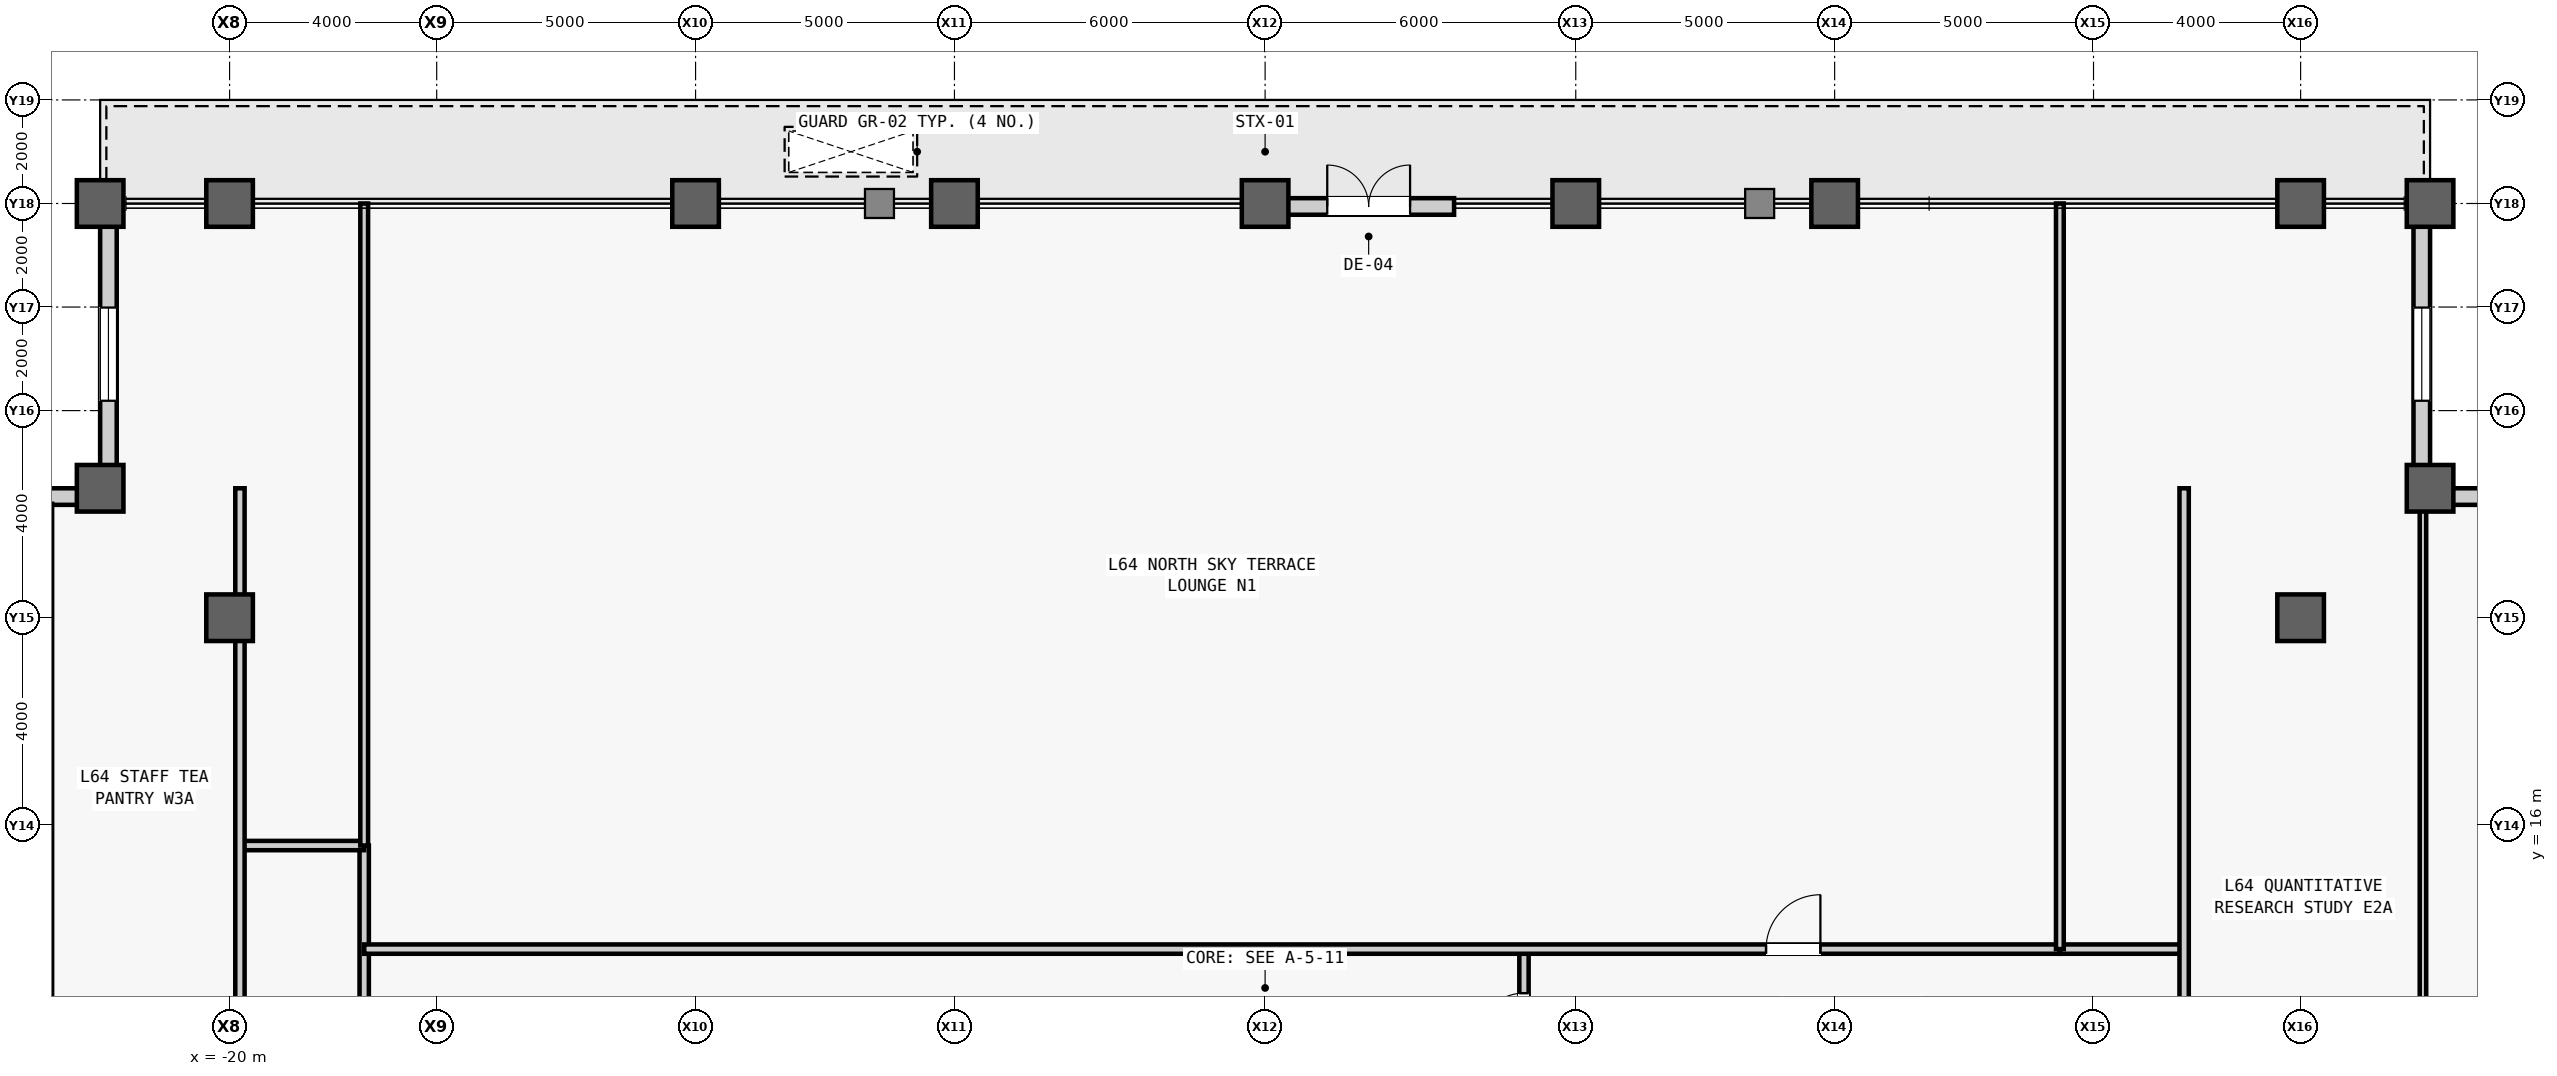
"""IFC4 building model, lengths in metres.
Left out: names, types, materials, properties, quantities, classifications, styles, units other than length and angle.
Written with IfcOpenShell. Run it as: python <this file> out.ifc"""

import sys

from ifc_helpers import new_model, si_unit, direction, frame, frame_2d, origin, origin_2d, place, context, subcontext, project, spatial, rectangle, hollow_rectangle, extrude, source, transform, mapped, element, fill, save


model = new_model("IFC4")
c1 = context("Model", 3, precision=1e-05, world=origin(), true_north=direction((0.0, 1.0)))
c2 = subcontext(c1, "Body", "Model", "MODEL_VIEW")
j1 = project(units=[si_unit("LENGTHUNIT", "METRE"), si_unit("PLANEANGLEUNIT", "RADIAN")], contexts=[c1])
p1 = place(None, origin())
s1 = spatial("IfcSite", under=j1, at=p1, CompositionType="ELEMENT")
p2 = place(p1, origin())
s2 = spatial("IfcBuilding", under=s1, at=p2, CompositionType="ELEMENT")
p3 = place(p2, frame((0.0, 0.0, 273.5)))
s3 = spatial("IfcBuildingStorey", under=s2, at=p3, CompositionType="ELEMENT", Elevation=273.5)
m1 = source(origin(), c2, "Body", "SweptSolid", [
    extrude(hollow_rectangle(XDim=0.9, YDim=0.9, WallThickness=0.05, at=origin_2d()), origin(), (0.0, 0.0, 1.0), 4.0),
])
for number, where, z_axis, x_axis in (
    (1, (-22.5, 22.5, 0.0), (0.0, 0.0, 1.0), (1.0, 0.0, 0.0)),
    (2, (-22.5, 28.0, 0.0), (0.0, 0.0, 1.0), (1.0, 0.0, 0.0)),
    (3, (-20.0, 20.0, 0.0), (0.0, 0.0, 1.0), (1.0, 0.0, 0.0)),
    (4, (-20.0, 28.0, 0.0), (0.0, 0.0, 1.0), (1.0, 0.0, 0.0)),
    (5, (-11.0, 28.0, 0.0), (0.0, 0.0, 1.0), (1.0, 0.0, 0.0)),
    (6, (-6.0, 28.0, 0.0), (0.0, 0.0, 1.0), (1.0, 0.0, 0.0)),
    (7, (0.0, 28.0, 0.0), (0.0, 0.0, 1.0), (1.0, 0.0, 0.0)),
    (8, (6.0, 28.0, 0.0), (0.0, 0.0, 1.0), (1.0, 0.0, 0.0)),
    (9, (11.0, 28.0, 0.0), (0.0, 0.0, 1.0), (1.0, 0.0, 0.0)),
    (10, (20.0, 20.0, 0.0), (0.0, 0.0, 1.0), (1.0, 0.0, 0.0)),
    (11, (20.0, 28.0, 0.0), (0.0, 0.0, 1.0), (1.0, 0.0, 0.0)),
    (12, (22.5, 22.5, 0.0), (0.0, 0.0, 1.0), (1.0, 0.0, 0.0)),
    (13, (22.5, 28.0, 0.0), (0.0, 0.0, 1.0), (1.0, 0.0, 0.0)),
):
    element("IfcColumn", number, at=place(p3, frame(where, z_axis=z_axis, x_axis=x_axis)), inside=s3, PredefinedType="COLUMN", context=c2, shape_type="MappedRepresentation", body=[
        mapped(m1, transform((0.0, 0.0, 0.0), scale=1.0)),
    ])
m2 = source(origin(), c2, "Body", "SweptSolid", [
    extrude(rectangle(XDim=5.18, YDim=0.32, at=frame_2d((2.59, 0.0))), origin(), (0.0, 0.0, 1.0), 3.231),
])
p4 = place(p3, frame((22.5, 22.34, 0.0), z_axis=(0.0, 0.0, 1.0), x_axis=(1.0, 0.0, 0.0)))
e14 = element("IfcWall", 14, at=p4, inside=s3, PredefinedType="STANDARD", context=c2, shape_type="MappedRepresentation", body=[
    mapped(m2, transform((0.0, 0.0, 0.0), scale=1.0)),
])
m3 = source(origin(), c2, "Body", "SweptSolid", [
    extrude(rectangle(XDim=1.8, YDim=2.4, at=frame_2d((0.9, 1.2))), frame((0.0, 0.17, 0.0), z_axis=(0.0, -1.0, 0.0), x_axis=(1.0, 0.0, 0.0)), (0.0, 0.0, 1.0), 0.34),
])
p5 = place(p4, frame((1.69, 0.0, 0.5)))
e15 = element("IfcOpeningElement", 15, at=p5, cuts=e14, PredefinedType="OPENING", context=c2, shape_type="MappedRepresentation", body=[
    mapped(m3, transform((0.0, 0.0, 0.0), scale=1.0)),
])
p6 = place(p3, frame((22.34, 22.5, 0.0), z_axis=(0.0, 0.0, 1.0), x_axis=(0.0, 1.0, 0.0)))
e16 = element("IfcWall", 16, at=p6, inside=s3, PredefinedType="STANDARD", context=c2, shape_type="MappedRepresentation", body=[
    mapped(m2, transform((0.0, 0.0, 0.0), scale=1.0)),
])
p7 = place(p6, frame((1.69, 0.0, 0.5)))
e17 = element("IfcOpeningElement", 17, at=p7, cuts=e16, PredefinedType="OPENING", context=c2, shape_type="MappedRepresentation", body=[
    mapped(m3, transform((0.0, 0.0, 0.0), scale=1.0)),
])
p8 = place(p3, frame((-22.34, 22.5, 0.0), z_axis=(0.0, 0.0, 1.0), x_axis=(0.0, 1.0, 0.0)))
e18 = element("IfcWall", 18, at=p8, inside=s3, PredefinedType="STANDARD", context=c2, shape_type="MappedRepresentation", body=[
    mapped(m2, transform((0.0, 0.0, 0.0), scale=1.0)),
])
p9 = place(p8, frame((1.69, 0.0, 0.5)))
e19 = element("IfcOpeningElement", 19, at=p9, cuts=e18, PredefinedType="OPENING", context=c2, shape_type="MappedRepresentation", body=[
    mapped(m3, transform((0.0, 0.0, 0.0), scale=1.0)),
])
p10 = place(p3, frame((-22.5, 22.34, 0.0), z_axis=(0.0, 0.0, 1.0), x_axis=(-1.0, 0.0, 0.0)))
e20 = element("IfcWall", 20, at=p10, inside=s3, PredefinedType="STANDARD", context=c2, shape_type="MappedRepresentation", body=[
    mapped(m2, transform((0.0, 0.0, 0.0), scale=1.0)),
])
p11 = place(p10, frame((1.69, 0.0, 0.5)))
e21 = element("IfcOpeningElement", 21, at=p11, cuts=e20, PredefinedType="OPENING", context=c2, shape_type="MappedRepresentation", body=[
    mapped(m3, transform((0.0, 0.0, 0.0), scale=1.0)),
])
m4 = source(origin(), c2, "Body", "SweptSolid", [
    extrude(rectangle(XDim=3.3, YDim=0.32, at=frame_2d((1.65, 0.0))), origin(), (0.0, 0.0, 1.0), 3.231),
])
p12 = place(p3, frame((0.35, 27.942, 0.0), z_axis=(0.0, 0.0, 1.0), x_axis=(1.0, 0.0, 0.0)))
e22 = element("IfcWall", 22, at=p12, inside=s3, PredefinedType="STANDARD", context=c2, shape_type="MappedRepresentation", body=[
    mapped(m4, transform((0.0, 0.0, 0.0), scale=1.0)),
])
m5 = source(origin(), c2, "Body", "SweptSolid", [
    extrude(rectangle(XDim=1.6, YDim=2.25, at=frame_2d((0.8, 1.125))), frame((0.0, 0.17, 0.0), z_axis=(0.0, -1.0, 0.0), x_axis=(1.0, 0.0, 0.0)), (0.0, 0.0, 1.0), 0.34),
])
p13 = place(p12, frame((0.85, 0.0, 0.0)))
e23 = element("IfcOpeningElement", 23, at=p13, cuts=e22, PredefinedType="OPENING", context=c2, shape_type="MappedRepresentation", body=[
    mapped(m5, transform((0.0, 0.0, 0.0), scale=1.0)),
])
m6 = source(origin(), c2, "Body", "SweptSolid", [
    extrude(rectangle(XDim=8.4, YDim=0.18, at=frame_2d((4.2, 0.0))), origin(), (0.0, 0.0, 1.0), 3.78),
])
p14 = place(p3, frame((-17.4, 7.2, 0.0), z_axis=(0.0, 0.0, 1.0), x_axis=(0.0, 1.0, 0.0)))
e24 = element("IfcWall", 24, at=p14, inside=s3, PredefinedType="PARTITIONING", context=c2, shape_type="MappedRepresentation", body=[
    mapped(m6, transform((0.0, 0.0, 0.0), scale=1.0)),
])
m7 = source(origin(), c2, "Body", "SweptSolid", [
    extrude(rectangle(XDim=2.6, YDim=0.18, at=frame_2d((1.3, 0.0))), origin(), (0.0, 0.0, 1.0), 3.78),
])
p15 = place(p3, frame((5.0, 11.0, 0.0), z_axis=(0.0, 0.0, 1.0), x_axis=(0.0, 1.0, 0.0)))
e25 = element("IfcWall", 25, at=p15, inside=s3, PredefinedType="PARTITIONING", context=c2, shape_type="MappedRepresentation", body=[
    mapped(m7, transform((0.0, 0.0, 0.0), scale=1.0)),
])
m8 = source(origin(), c2, "Body", "SweptSolid", [
    extrude(rectangle(XDim=0.9, YDim=2.15, at=frame_2d((0.45, 1.075))), frame((0.0, 0.1, 0.0), z_axis=(0.0, -1.0, 0.0), x_axis=(1.0, 0.0, 0.0)), (0.0, 0.0, 1.0), 0.2),
])
p16 = place(p15, frame((0.85, 0.0, 0.0)))
e26 = element("IfcOpeningElement", 26, at=p16, cuts=e25, PredefinedType="OPENING", context=c2, shape_type="MappedRepresentation", body=[
    mapped(m8, transform((0.0, 0.0, 0.0), scale=1.0)),
])
m9 = source(origin(), c2, "Body", "SweptSolid", [
    extrude(rectangle(XDim=2.4, YDim=0.18, at=frame_2d((1.2, 0.0))), origin(), (0.0, 0.0, 1.0), 3.78),
])
p17 = place(p3, frame((-19.8, 15.6, 0.0), z_axis=(0.0, 0.0, 1.0), x_axis=(1.0, 0.0, 0.0)))
e27 = element("IfcWall", 27, at=p17, inside=s3, PredefinedType="PARTITIONING", context=c2, shape_type="MappedRepresentation", body=[
    mapped(m9, transform((0.0, 0.0, 0.0), scale=1.0)),
])
m10 = source(origin(), c2, "Body", "SweptSolid", [
    extrude(rectangle(XDim=2.4, YDim=0.18, at=frame_2d((1.2, 0.0))), origin(), (0.0, 0.0, 1.0), 3.78),
])
p18 = place(p3, frame((15.35, 13.6, 0.0), z_axis=(0.0, 0.0, 1.0), x_axis=(1.0, 0.0, 0.0)))
e28 = element("IfcWall", 28, at=p18, inside=s3, PredefinedType="PARTITIONING", context=c2, shape_type="MappedRepresentation", body=[
    mapped(m10, transform((0.0, 0.0, 0.0), scale=1.0)),
])
m11 = source(origin(), c2, "Body", "SweptSolid", [
    extrude(rectangle(XDim=32.75, YDim=0.18, at=frame_2d((16.375, 0.0))), origin(), (0.0, 0.0, 1.0), 3.78),
])
p19 = place(p3, frame((-17.4, 13.6, 0.0), z_axis=(0.0, 0.0, 1.0), x_axis=(1.0, 0.0, 0.0)))
e29 = element("IfcWall", 29, at=p19, inside=s3, PredefinedType="PARTITIONING", context=c2, shape_type="MappedRepresentation", body=[
    mapped(m11, transform((0.0, 0.0, 0.0), scale=1.0)),
])
m12 = source(origin(), c2, "Body", "SweptSolid", [
    extrude(rectangle(XDim=1.05, YDim=2.2, at=frame_2d((0.525, 1.1))), frame((0.0, 0.1, 0.0), z_axis=(0.0, -1.0, 0.0), x_axis=(1.0, 0.0, 0.0)), (0.0, 0.0, 1.0), 0.2),
])
p20 = place(p19, frame((27.075, 0.0, 0.0)))
e30 = element("IfcOpeningElement", 30, at=p20, cuts=e29, PredefinedType="OPENING", context=c2, shape_type="MappedRepresentation", body=[
    mapped(m12, transform((0.0, 0.0, 0.0), scale=1.0)),
])
m13 = source(origin(), c2, "Body", "SweptSolid", [
    extrude(rectangle(XDim=12.4, YDim=0.15, at=frame_2d((6.2, 0.0))), origin(), (0.0, 0.0, 1.0), 3.78),
])
p21 = place(p3, frame((-17.4, 15.6, 0.0), z_axis=(0.0, 0.0, 1.0), x_axis=(0.0, 1.0, 0.0)))
e31 = element("IfcWall", 31, at=p21, inside=s3, PredefinedType="PARTITIONING", context=c2, shape_type="MappedRepresentation", body=[
    mapped(m13, transform((0.0, 0.0, 0.0), scale=1.0)),
])
m14 = source(origin(), c2, "Body", "SweptSolid", [
    extrude(rectangle(XDim=14.4, YDim=0.15, at=frame_2d((7.2, 0.0))), origin(), (0.0, 0.0, 1.0), 3.78),
])
p22 = place(p3, frame((15.35, 13.6, 0.0), z_axis=(0.0, 0.0, 1.0), x_axis=(0.0, 1.0, 0.0)))
e32 = element("IfcWall", 32, at=p22, inside=s3, PredefinedType="PARTITIONING", context=c2, shape_type="MappedRepresentation", body=[
    mapped(m14, transform((0.0, 0.0, 0.0), scale=1.0)),
])
m15 = source(origin(), c2, "Body", "SweptSolid", [
    extrude(rectangle(XDim=41.2, YDim=0.18, at=frame_2d((20.6, 0.0))), origin(), (0.0, 0.0, 1.0), 3.164),
])
p23 = place(p3, frame((-19.8, -18.7, 0.0), z_axis=(0.0, 0.0, 1.0), x_axis=(0.0, 1.0, 0.0)))
e33 = element("IfcWall", 33, at=p23, inside=s3, PredefinedType="PARTITIONING", context=c2, shape_type="MappedRepresentation", body=[
    mapped(m15, transform((0.0, 0.0, 0.0), scale=1.0)),
])
m16 = source(origin(), c2, "Body", "SweptSolid", [
    extrude(rectangle(XDim=0.95, YDim=2.15, at=frame_2d((0.475, 1.075))), frame((0.0, 0.1, 0.0), z_axis=(0.0, -1.0, 0.0), x_axis=(1.0, 0.0, 0.0)), (0.0, 0.0, 1.0), 0.2),
])
p24 = place(p23, frame((7.329, 0.0, 0.0)))
e34 = element("IfcOpeningElement", 34, at=p24, cuts=e33, PredefinedType="OPENING", context=c2, shape_type="MappedRepresentation", body=[
    mapped(m16, transform((0.0, 0.0, 0.0), scale=1.0)),
])
p25 = place(p23, frame((17.875, 0.0, 0.0)))
e35 = element("IfcOpeningElement", 35, at=p25, cuts=e33, PredefinedType="OPENING", context=c2, shape_type="MappedRepresentation", body=[
    mapped(m16, transform((0.0, 0.0, 0.0), scale=1.0)),
])
p26 = place(p23, frame((28.421, 0.0, 0.0)))
e36 = element("IfcOpeningElement", 36, at=p26, cuts=e33, PredefinedType="OPENING", context=c2, shape_type="MappedRepresentation", body=[
    mapped(m16, transform((0.0, 0.0, 0.0), scale=1.0)),
])
m17 = source(origin(), c2, "Body", "SweptSolid", [
    extrude(rectangle(XDim=23.85, YDim=0.125, at=frame_2d((11.925, 0.0))), origin(), (0.0, 0.0, 1.0), 3.164),
])
p27 = place(p3, frame((22.363, -1.35, 0.0), z_axis=(0.0, 0.0, 1.0), x_axis=(0.0, 1.0, 0.0)))
e37 = element("IfcWall", 37, at=p27, inside=s3, PredefinedType="PARTITIONING", context=c2, shape_type="MappedRepresentation", body=[
    mapped(m17, transform((0.0, 0.0, 0.0), scale=1.0)),
])
m18 = source(origin(), c2, "Body", "SweptSolid", [
    extrude(rectangle(XDim=0.95, YDim=2.15, at=frame_2d((0.475, 1.075))), frame((0.0, 0.073, 0.0), z_axis=(0.0, -1.0, 0.0), x_axis=(1.0, 0.0, 0.0)), (0.0, 0.0, 1.0), 0.145),
])
p28 = place(p27, frame((7.0, 0.0, 0.0)))
e38 = element("IfcOpeningElement", 38, at=p28, cuts=e37, PredefinedType="OPENING", context=c2, shape_type="MappedRepresentation", body=[
    mapped(m18, transform((0.0, 0.0, 0.0), scale=1.0)),
])
m19 = source(origin(), c2, "Body", "SweptSolid", [
    extrude(rectangle(XDim=41.2, YDim=0.18, at=frame_2d((20.6, 0.0))), origin(), (0.0, 0.0, 1.0), 3.78),
])
p29 = place(p3, frame((17.75, -18.7, 0.0), z_axis=(0.0, 0.0, 1.0), x_axis=(0.0, 1.0, 0.0)))
e39 = element("IfcWall", 39, at=p29, inside=s3, PredefinedType="PARTITIONING", context=c2, shape_type="MappedRepresentation", body=[
    mapped(m19, transform((0.0, 0.0, 0.0), scale=1.0)),
])
p30 = place(p29, frame((9.7, 0.0, 0.0)))
e40 = element("IfcOpeningElement", 40, at=p30, cuts=e39, PredefinedType="OPENING", context=c2, shape_type="MappedRepresentation", body=[
    mapped(m16, transform((0.0, 0.0, 0.0), scale=1.0)),
])
p31 = place(p29, frame((24.05, 0.0, 0.0)))
e41 = element("IfcOpeningElement", 41, at=p31, cuts=e39, PredefinedType="OPENING", context=c2, shape_type="MappedRepresentation", body=[
    mapped(m16, transform((0.0, 0.0, 0.0), scale=1.0)),
])
m20 = source(origin(), c2, "Body", "SweptSolid", [
    extrude(rectangle(XDim=1.8, YDim=2.4, at=frame_2d((0.9, 1.2))), frame((0.0, 0.03, 0.0), z_axis=(0.0, -1.0, 0.0), x_axis=(1.0, 0.0, 0.0)), (0.0, 0.0, 1.0), 0.06),
])
p32 = place(p7, origin())
e42 = element("IfcWindow", 42, at=p32, inside=s3, PartitioningType="SINGLE_PANEL", PredefinedType="WINDOW", context=c2, shape_type="MappedRepresentation", body=[
    mapped(m20, transform((0.0, 0.0, 0.0), scale=1.0)),
])
fill(e17, e42)
p33 = place(p9, origin())
e43 = element("IfcWindow", 43, at=p33, inside=s3, PartitioningType="SINGLE_PANEL", PredefinedType="WINDOW", context=c2, shape_type="MappedRepresentation", body=[
    mapped(m20, transform((0.0, 0.0, 0.0), scale=1.0)),
])
fill(e19, e43)
m21 = source(origin(), c2, "Body", "SweptSolid", [
    extrude(rectangle(XDim=1.6, YDim=2.25, at=frame_2d((0.8, 1.125))), frame((0.0, 0.025, 0.0), z_axis=(0.0, -1.0, 0.0), x_axis=(1.0, 0.0, 0.0)), (0.0, 0.0, 1.0), 0.05),
])
p34 = place(p13, origin())
e44 = element("IfcDoor", 44, at=p34, inside=s3, OperationType="DOUBLE_DOOR_SINGLE_SWING", PredefinedType="DOOR", context=c2, shape_type="MappedRepresentation", body=[
    mapped(m21, transform((0.0, 0.0, 0.0), scale=1.0)),
])
fill(e23, e44)
m22 = source(origin(), c2, "Body", "SweptSolid", [
    extrude(rectangle(XDim=0.9, YDim=2.15, at=frame_2d((0.45, 1.075))), frame((0.0, 0.025, 0.0), z_axis=(0.0, -1.0, 0.0), x_axis=(1.0, 0.0, 0.0)), (0.0, 0.0, 1.0), 0.05),
])
p35 = place(p16, origin())
e45 = element("IfcDoor", 45, at=p35, inside=s3, OperationType="SINGLE_SWING_LEFT", PredefinedType="DOOR", context=c2, shape_type="MappedRepresentation", body=[
    mapped(m22, transform((0.0, 0.0, 0.0), scale=1.0)),
])
fill(e26, e45)
m23 = source(origin(), c2, "Body", "SweptSolid", [
    extrude(rectangle(XDim=1.05, YDim=2.2, at=frame_2d((0.525, 1.1))), frame((0.0, 0.025, 0.0), z_axis=(0.0, -1.0, 0.0), x_axis=(1.0, 0.0, 0.0)), (0.0, 0.0, 1.0), 0.05),
])
p36 = place(p20, origin())
e46 = element("IfcDoor", 46, at=p36, inside=s3, OperationType="SINGLE_SWING_RIGHT", PredefinedType="DOOR", context=c2, shape_type="MappedRepresentation", body=[
    mapped(m23, transform((0.0, 0.0, 0.0), scale=1.0)),
])
fill(e30, e46)
save(model, sys.argv[1])
